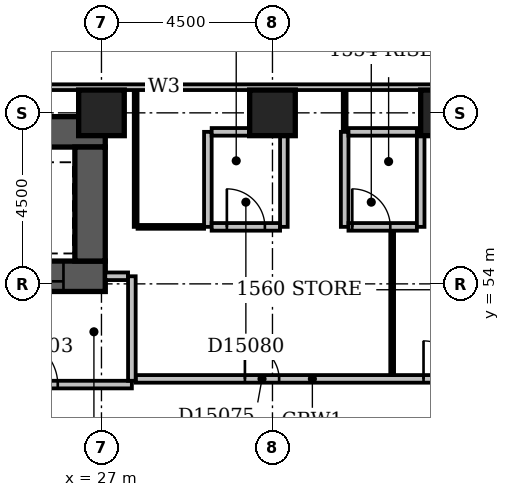
"""IFC4 building model, lengths in metres.
Left out: names, types, materials, properties, quantities, classifications, styles, units other than length and angle.
Written with IfcOpenShell. Run it as: python <this file> out.ifc"""

import sys

from ifc_helpers import new_model, si_unit, direction, frame, frame_2d, origin, origin_2d, place, context, subcontext, project, spatial, rectangle, extrude, element, fill, save


model = new_model("IFC4")
c1 = context("Model", 3, precision=1e-05, world=origin(), true_north=direction((0.0, 1.0)))
c2 = subcontext(c1, "Body", "Model", "MODEL_VIEW")
j1 = project(units=[si_unit("LENGTHUNIT", "METRE"), si_unit("PLANEANGLEUNIT", "RADIAN")], contexts=[c1])
p1 = place(None, origin())
s1 = spatial("IfcSite", under=j1, at=p1, CompositionType="ELEMENT")
p2 = place(p1, origin())
s2 = spatial("IfcBuilding", under=s1, at=p2, CompositionType="ELEMENT")
p3 = place(p2, frame((0.0, 0.0, 65.0)))
s3 = spatial("IfcBuildingStorey", under=s2, at=p3, CompositionType="ELEMENT", Elevation=65.0)
p4 = place(p3, frame((23.8, 54.2, -0.3), z_axis=(0.0, 0.0, 1.0), x_axis=(1.0, 0.0, 0.0)))
e1 = element("IfcWall", 1, at=p4, inside=s3, PredefinedType="SHEAR", context=c2, shape_type="SweptSolid", body=[
    extrude(rectangle(XDim=3.3, YDim=0.8, at=frame_2d((1.65, 0.0))), origin(), (0.0, 0.0, 1.0), 3.6),
])
p5 = place(p4, frame((1.1, 0.0, 0.3)))
e2 = element("IfcOpeningElement", 2, at=p5, cuts=e1, PredefinedType="OPENING", context=c2, shape_type="SweptSolid", body=[
    extrude(rectangle(XDim=1.1, YDim=2.1, at=frame_2d((0.55, 1.05))), frame((0.0, 0.412, 0.0), z_axis=(0.0, -1.0, 0.0), x_axis=(1.0, 0.0, 0.0)), (0.0, 0.0, 1.0), 0.824),
])
p6 = place(p3, frame((23.8, 58.0, -0.3), z_axis=(0.0, 0.0, 1.0), x_axis=(1.0, 0.0, 0.0)))
e3 = element("IfcWall", 3, at=p6, inside=s3, PredefinedType="SHEAR", context=c2, shape_type="SweptSolid", body=[
    extrude(rectangle(XDim=3.3, YDim=0.8, at=frame_2d((1.65, 0.0))), origin(), (0.0, 0.0, 1.0), 3.6),
])
p7 = place(p3, frame((26.7, 54.6, -0.3), z_axis=(0.0, 0.0, 1.0), x_axis=(0.0, 1.0, 0.0)))
e4 = element("IfcWall", 4, at=p7, inside=s3, PredefinedType="SHEAR", context=c2, shape_type="SweptSolid", body=[
    extrude(rectangle(XDim=3.0, YDim=0.8, at=frame_2d((1.5, 0.0))), origin(), (0.0, 0.0, 1.0), 3.6),
])
for number, where, z_axis, x_axis in (
    (5, (27.0, 58.5, -0.3), (0.0, 0.0, 1.0), (1.0, 0.0, 0.0)),
    (6, (31.5, 58.5, -0.3), (0.0, 0.0, 1.0), (1.0, 0.0, 0.0)),
    (7, (36.0, 58.5, -0.3), (0.0, 0.0, 1.0), (1.0, 0.0, 0.0)),
):
    element("IfcColumn", number, at=place(p3, frame(where, z_axis=z_axis, x_axis=x_axis)), inside=s3, PredefinedType="COLUMN", context=c2, shape_type="SweptSolid", body=[
        extrude(rectangle(XDim=1.2, YDim=1.2, at=origin_2d()), origin(), (0.0, 0.0, 1.0), 3.6),
    ])
p8 = place(p3, frame((68.1, 59.175, 0.0), z_axis=(0.0, 0.0, 1.0), x_axis=(-1.0, 0.0, 0.0)))
e8 = element("IfcWall", 8, at=p8, inside=s3, PredefinedType="STANDARD", context=c2, shape_type="SweptSolid", body=[
    extrude(rectangle(XDim=68.85, YDim=0.15, at=frame_2d((34.425, 0.0))), origin(), (0.0, 0.0, 1.0), 2.7),
])
p9 = place(p8, frame((1.65, 0.0, 0.6)))
e9 = element("IfcOpeningElement", 9, at=p9, cuts=e8, PredefinedType="OPENING", context=c2, shape_type="SweptSolid", body=[
    extrude(rectangle(XDim=2.4, YDim=1.8, at=frame_2d((1.2, 0.9))), frame((0.0, 0.087, 0.0), z_axis=(0.0, -1.0, 0.0), x_axis=(1.0, 0.0, 0.0)), (0.0, 0.0, 1.0), 0.174),
])
p10 = place(p8, frame((6.15, 0.0, 0.6)))
e10 = element("IfcOpeningElement", 10, at=p10, cuts=e8, PredefinedType="OPENING", context=c2, shape_type="SweptSolid", body=[
    extrude(rectangle(XDim=2.4, YDim=1.8, at=frame_2d((1.2, 0.9))), frame((0.0, 0.087, 0.0), z_axis=(0.0, -1.0, 0.0), x_axis=(1.0, 0.0, 0.0)), (0.0, 0.0, 1.0), 0.174),
])
p11 = place(p8, frame((39.002, 0.0, 0.6)))
e11 = element("IfcOpeningElement", 11, at=p11, cuts=e8, PredefinedType="OPENING", context=c2, shape_type="SweptSolid", body=[
    extrude(rectangle(XDim=0.9, YDim=1.8, at=frame_2d((0.45, 0.9))), frame((0.0, 0.087, 0.0), z_axis=(0.0, -1.0, 0.0), x_axis=(1.0, 0.0, 0.0)), (0.0, 0.0, 1.0), 0.174),
])
p12 = place(p3, frame((23.0, 51.35, 0.0), z_axis=(0.0, 0.0, 1.0), x_axis=(1.0, 0.0, 0.0)))
e12 = element("IfcWall", 12, at=p12, inside=s3, PredefinedType="PARTITIONING", context=c2, shape_type="SweptSolid", body=[
    extrude(rectangle(XDim=4.8, YDim=0.2, at=frame_2d((2.4, 0.0))), origin(), (0.0, 0.0, 1.0), 3.3),
])
p13 = place(p12, frame((1.65, 0.0, 0.0)))
e13 = element("IfcOpeningElement", 13, at=p13, cuts=e12, PredefinedType="OPENING", context=c2, shape_type="SweptSolid", body=[
    extrude(rectangle(XDim=1.2, YDim=2.1, at=frame_2d((0.6, 1.05))), frame((0.0, 0.112, 0.0), z_axis=(0.0, -1.0, 0.0), x_axis=(1.0, 0.0, 0.0)), (0.0, 0.0, 1.0), 0.224),
])
p14 = place(p3, frame((27.8, 51.45, 0.0), z_axis=(0.0, 0.0, 1.0), x_axis=(0.0, 1.0, 0.0)))
e14 = element("IfcWall", 14, at=p14, inside=s3, PredefinedType="PARTITIONING", context=c2, shape_type="SweptSolid", body=[
    extrude(rectangle(XDim=2.75, YDim=0.2, at=frame_2d((1.375, 0.0))), origin(), (0.0, 0.0, 1.0), 3.3),
])
p15 = place(p3, frame((27.1, 54.2, 0.0), z_axis=(0.0, 0.0, 1.0), x_axis=(1.0, 0.0, 0.0)))
e15 = element("IfcWall", 15, at=p15, inside=s3, PredefinedType="PARTITIONING", context=c2, shape_type="SweptSolid", body=[
    extrude(rectangle(XDim=0.6, YDim=0.2, at=frame_2d((0.3, 0.0))), origin(), (0.0, 0.0, 1.0), 3.3),
])
p16 = place(p3, frame((27.9, 51.5, 0.0), z_axis=(0.0, 0.0, 1.0), x_axis=(1.0, 0.0, 0.0)))
e16 = element("IfcWall", 16, at=p16, inside=s3, PredefinedType="PARTITIONING", context=c2, shape_type="SweptSolid", body=[
    extrude(rectangle(XDim=9.3, YDim=0.2, at=frame_2d((4.65, 0.0))), origin(), (0.0, 0.0, 1.0), 3.3),
])
p17 = place(p16, frame((2.875, 0.0, 0.0)))
e17 = element("IfcOpeningElement", 17, at=p17, cuts=e16, PredefinedType="OPENING", context=c2, shape_type="SweptSolid", body=[
    extrude(rectangle(XDim=0.9, YDim=2.1, at=frame_2d((0.45, 1.05))), frame((0.0, 0.112, 0.0), z_axis=(0.0, -1.0, 0.0), x_axis=(1.0, 0.0, 0.0)), (0.0, 0.0, 1.0), 0.224),
])
p18 = place(p16, frame((7.575, 0.0, 0.0)))
e18 = element("IfcOpeningElement", 18, at=p18, cuts=e16, PredefinedType="OPENING", context=c2, shape_type="SweptSolid", body=[
    extrude(rectangle(XDim=1.0, YDim=2.1, at=frame_2d((0.5, 1.05))), frame((0.0, 0.112, 0.0), z_axis=(0.0, -1.0, 0.0), x_axis=(1.0, 0.0, 0.0)), (0.0, 0.0, 1.0), 0.224),
])
p19 = place(p3, frame((34.65, 51.6, 0.0), z_axis=(0.0, 0.0, 1.0), x_axis=(0.0, 1.0, 0.0)))
e19 = element("IfcWall", 19, at=p19, inside=s3, PredefinedType="PARTITIONING", context=c2, shape_type="SweptSolid", body=[
    extrude(rectangle(XDim=3.8, YDim=0.1, at=frame_2d((1.9, 0.0))), origin(), (0.0, 0.0, 1.0), 3.3),
])
p20 = place(p3, frame((27.9, 55.5, 0.0), z_axis=(0.0, 0.0, 1.0), x_axis=(0.0, 1.0, 0.0)))
e20 = element("IfcWall", 20, at=p20, inside=s3, PredefinedType="PARTITIONING", context=c2, shape_type="SweptSolid", body=[
    extrude(rectangle(XDim=3.6, YDim=0.1, at=frame_2d((1.8, 0.0))), origin(), (0.0, 0.0, 1.0), 3.3),
])
p21 = place(p3, frame((27.95, 55.5, 0.0), z_axis=(0.0, 0.0, 1.0), x_axis=(1.0, 0.0, 0.0)))
e21 = element("IfcWall", 21, at=p21, inside=s3, PredefinedType="PARTITIONING", context=c2, shape_type="SweptSolid", body=[
    extrude(rectangle(XDim=1.75, YDim=0.1, at=frame_2d((0.875, 0.0))), origin(), (0.0, 0.0, 1.0), 3.3),
])
p22 = place(p3, frame((29.8, 55.5, 0.0), z_axis=(0.0, 0.0, 1.0), x_axis=(0.0, 1.0, 0.0)))
e22 = element("IfcWall", 22, at=p22, inside=s3, PredefinedType="PARTITIONING", context=c2, shape_type="SweptSolid", body=[
    extrude(rectangle(XDim=2.5, YDim=0.2, at=frame_2d((1.25, 0.0))), origin(), (0.0, 0.0, 1.0), 3.3),
])
p23 = place(p3, frame((29.9, 55.5, 0.0), z_axis=(0.0, 0.0, 1.0), x_axis=(1.0, 0.0, 0.0)))
e23 = element("IfcWall", 23, at=p23, inside=s3, PredefinedType="PARTITIONING", context=c2, shape_type="SweptSolid", body=[
    extrude(rectangle(XDim=1.8, YDim=0.2, at=frame_2d((0.9, 0.0))), origin(), (0.0, 0.0, 1.0), 3.3),
])
p24 = place(p23, frame((0.4, 0.0, 0.0)))
e24 = element("IfcOpeningElement", 24, at=p24, cuts=e23, PredefinedType="OPENING", context=c2, shape_type="SweptSolid", body=[
    extrude(rectangle(XDim=1.0, YDim=2.1, at=frame_2d((0.5, 1.05))), frame((0.0, 0.112, 0.0), z_axis=(0.0, -1.0, 0.0), x_axis=(1.0, 0.0, 0.0)), (0.0, 0.0, 1.0), 0.224),
])
for number, where, z_axis, x_axis in (
    (25, (31.8, 55.5, 0.0), (0.0, 0.0, 1.0), (0.0, 1.0, 0.0)),
    (26, (33.4, 55.5, 0.0), (0.0, 0.0, 1.0), (0.0, 1.0, 0.0)),
):
    element("IfcWall", number, at=place(p3, frame(where, z_axis=z_axis, x_axis=x_axis)), inside=s3, PredefinedType="PARTITIONING", context=c2, shape_type="SweptSolid", body=[
        extrude(rectangle(XDim=2.5, YDim=0.2, at=frame_2d((1.25, 0.0))), origin(), (0.0, 0.0, 1.0), 3.3),
    ])
p25 = place(p3, frame((33.5, 55.5, 0.0), z_axis=(0.0, 0.0, 1.0), x_axis=(1.0, 0.0, 0.0)))
e27 = element("IfcWall", 27, at=p25, inside=s3, PredefinedType="PARTITIONING", context=c2, shape_type="SweptSolid", body=[
    extrude(rectangle(XDim=1.8, YDim=0.2, at=frame_2d((0.9, 0.0))), origin(), (0.0, 0.0, 1.0), 3.3),
])
p26 = place(p25, frame((0.1, 0.0, 0.0)))
e28 = element("IfcOpeningElement", 28, at=p26, cuts=e27, PredefinedType="OPENING", context=c2, shape_type="SweptSolid", body=[
    extrude(rectangle(XDim=1.0, YDim=2.1, at=frame_2d((0.5, 1.05))), frame((0.0, 0.112, 0.0), z_axis=(0.0, -1.0, 0.0), x_axis=(1.0, 0.0, 0.0)), (0.0, 0.0, 1.0), 0.224),
])
p27 = place(p3, frame((35.4, 55.5, 0.0), z_axis=(0.0, 0.0, 1.0), x_axis=(0.0, 1.0, 0.0)))
e29 = element("IfcWall", 29, at=p27, inside=s3, PredefinedType="PARTITIONING", context=c2, shape_type="SweptSolid", body=[
    extrude(rectangle(XDim=2.5, YDim=0.2, at=frame_2d((1.25, 0.0))), origin(), (0.0, 0.0, 1.0), 2.4),
])
p28 = place(p3, frame((29.9, 58.0, 0.0), z_axis=(0.0, 0.0, 1.0), x_axis=(1.0, 0.0, 0.0)))
e30 = element("IfcWall", 30, at=p28, inside=s3, PredefinedType="PARTITIONING", context=c2, shape_type="SweptSolid", body=[
    extrude(rectangle(XDim=1.8, YDim=0.2, at=frame_2d((0.9, 0.0))), origin(), (0.0, 0.0, 1.0), 3.3),
])
p29 = place(p3, frame((33.4, 58.0, 0.0), z_axis=(0.0, 0.0, 1.0), x_axis=(0.0, 1.0, 0.0)))
e31 = element("IfcWall", 31, at=p29, inside=s3, PredefinedType="PARTITIONING", context=c2, shape_type="SweptSolid", body=[
    extrude(rectangle(XDim=1.1, YDim=0.1, at=frame_2d((0.55, 0.0))), origin(), (0.0, 0.0, 1.0), 3.3),
])
p30 = place(p3, frame((33.5, 58.0, 0.0), z_axis=(0.0, 0.0, 1.0), x_axis=(1.0, 0.0, 0.0)))
e32 = element("IfcWall", 32, at=p30, inside=s3, PredefinedType="PARTITIONING", context=c2, shape_type="SweptSolid", body=[
    extrude(rectangle(XDim=1.8, YDim=0.2, at=frame_2d((0.9, 0.0))), origin(), (0.0, 0.0, 1.0), 3.3),
])
p31 = place(p11, origin())
e33 = element("IfcWindow", 33, at=p31, inside=s3, PartitioningType="SINGLE_PANEL", PredefinedType="WINDOW", context=c2, shape_type="SweptSolid", body=[
    extrude(rectangle(XDim=0.9, YDim=1.8, at=frame_2d((0.45, 0.9))), frame((0.0, 0.03, 0.0), z_axis=(0.0, -1.0, 0.0), x_axis=(1.0, 0.0, 0.0)), (0.0, 0.0, 1.0), 0.06),
])
fill(e11, e33)
p32 = place(p13, origin())
e34 = element("IfcDoor", 34, at=p32, inside=s3, OperationType="SINGLE_SWING_LEFT", PredefinedType="DOOR", context=c2, shape_type="SweptSolid", body=[
    extrude(rectangle(XDim=1.2, YDim=2.1, at=frame_2d((0.6, 1.05))), frame((0.0, 0.025, 0.0), z_axis=(0.0, -1.0, 0.0), x_axis=(1.0, 0.0, 0.0)), (0.0, 0.0, 1.0), 0.05),
])
fill(e13, e34)
p33 = place(p5, origin())
e35 = element("IfcDoor", 35, at=p33, inside=s3, OperationType="SLIDING_TO_LEFT", PredefinedType="DOOR", context=c2, shape_type="SweptSolid", body=[
    extrude(rectangle(XDim=1.1, YDim=2.1, at=frame_2d((0.55, 1.05))), frame((0.0, 0.025, 0.0), z_axis=(0.0, -1.0, 0.0), x_axis=(1.0, 0.0, 0.0)), (0.0, 0.0, 1.0), 0.05),
])
fill(e2, e35)
p34 = place(p17, origin())
e36 = element("IfcDoor", 36, at=p34, inside=s3, OperationType="SINGLE_SWING_LEFT", PredefinedType="DOOR", context=c2, shape_type="SweptSolid", body=[
    extrude(rectangle(XDim=0.9, YDim=2.1, at=frame_2d((0.45, 1.05))), frame((0.0, 0.025, 0.0), z_axis=(0.0, -1.0, 0.0), x_axis=(1.0, 0.0, 0.0)), (0.0, 0.0, 1.0), 0.05),
])
fill(e17, e36)
p35 = place(p18, origin())
e37 = element("IfcDoor", 37, at=p35, inside=s3, OperationType="SINGLE_SWING_LEFT", PredefinedType="DOOR", context=c2, shape_type="SweptSolid", body=[
    extrude(rectangle(XDim=1.0, YDim=2.1, at=frame_2d((0.5, 1.05))), frame((0.0, 0.025, 0.0), z_axis=(0.0, -1.0, 0.0), x_axis=(1.0, 0.0, 0.0)), (0.0, 0.0, 1.0), 0.05),
])
fill(e18, e37)
p36 = place(p24, origin())
e38 = element("IfcDoor", 38, at=p36, inside=s3, OperationType="SINGLE_SWING_LEFT", PredefinedType="DOOR", context=c2, shape_type="SweptSolid", body=[
    extrude(rectangle(XDim=1.0, YDim=2.1, at=frame_2d((0.5, 1.05))), frame((0.0, 0.025, 0.0), z_axis=(0.0, -1.0, 0.0), x_axis=(1.0, 0.0, 0.0)), (0.0, 0.0, 1.0), 0.05),
])
fill(e24, e38)
p37 = place(p26, origin())
e39 = element("IfcDoor", 39, at=p37, inside=s3, OperationType="SINGLE_SWING_LEFT", PredefinedType="DOOR", context=c2, shape_type="SweptSolid", body=[
    extrude(rectangle(XDim=1.0, YDim=2.1, at=frame_2d((0.5, 1.05))), frame((0.0, 0.025, 0.0), z_axis=(0.0, -1.0, 0.0), x_axis=(1.0, 0.0, 0.0)), (0.0, 0.0, 1.0), 0.05),
])
fill(e28, e39)
save(model, sys.argv[1])
